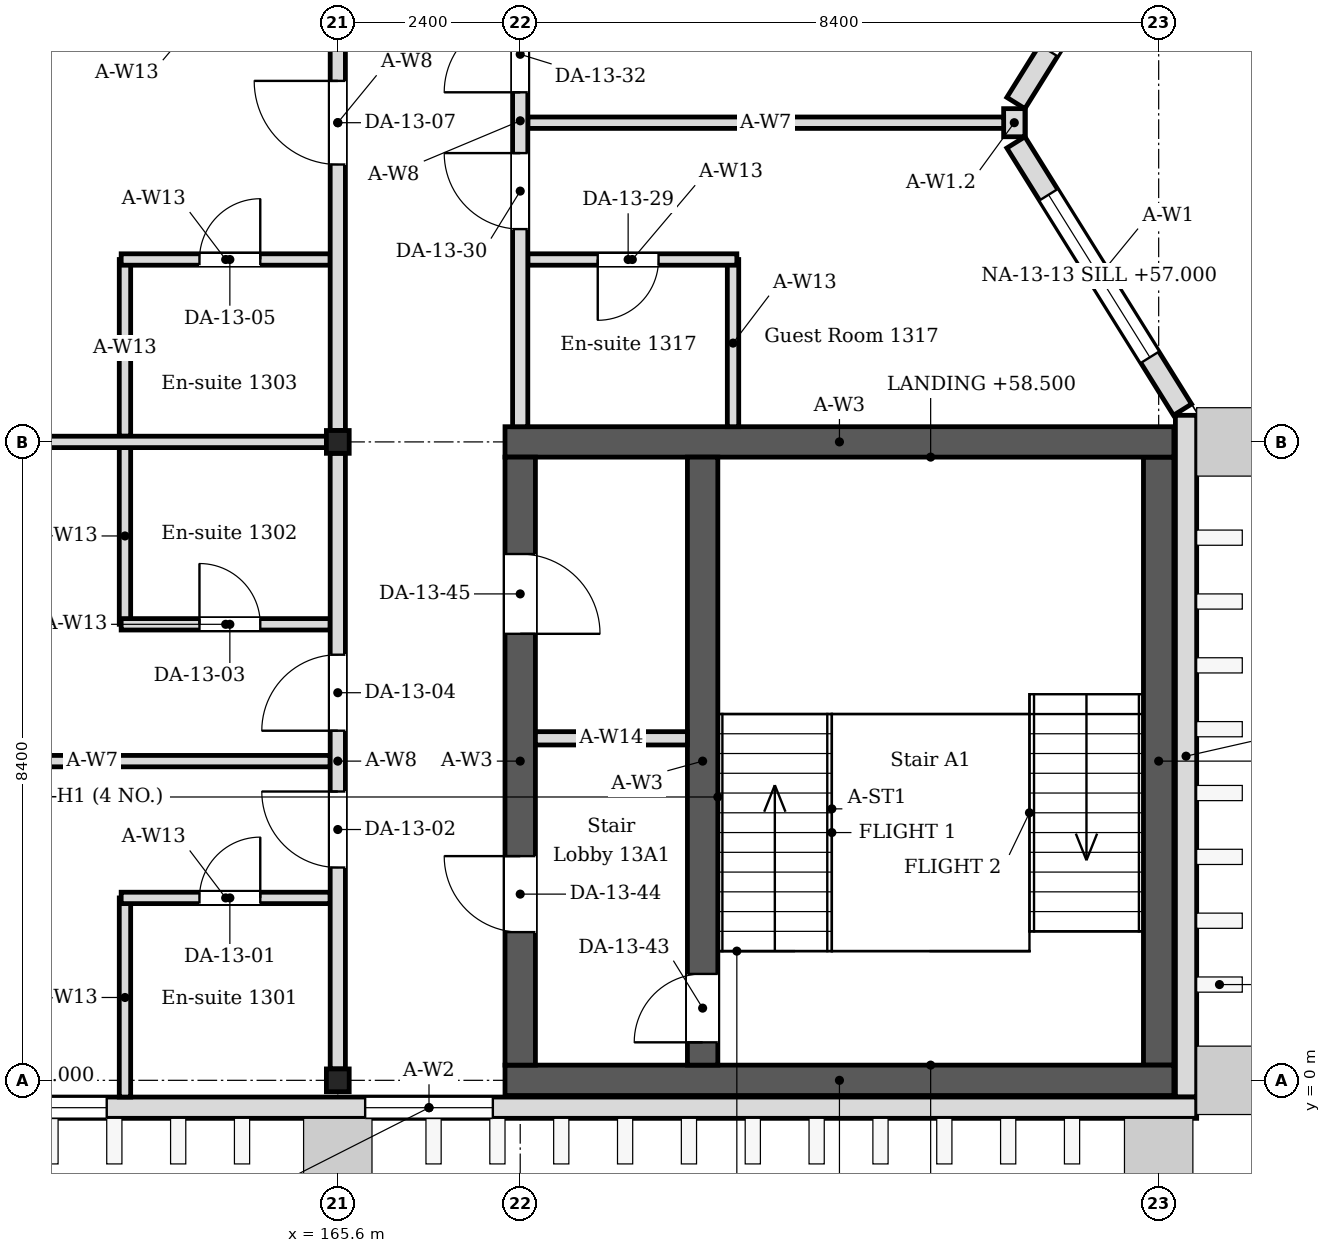
"""IFC4 building model, lengths in metres.
Left out: names, types, materials, properties, quantities, classifications, styles, units other than length and angle.
Written with IfcOpenShell. Run it as: python <this file> out.ifc"""

import sys

from ifc_helpers import new_model, si_unit, direction, frame, frame_2d, origin, origin_2d, place, context, subcontext, project, spatial, rectangle, i_section, extrude, element, fill, save


model = new_model("IFC4")
c1 = context("Model", 3, precision=1e-05, world=origin(), true_north=direction((0.0, 1.0)))
c2 = subcontext(c1, "Body", "Model", "MODEL_VIEW")
j1 = project(units=[si_unit("LENGTHUNIT", "METRE"), si_unit("PLANEANGLEUNIT", "RADIAN")], contexts=[c1])
p1 = place(None, origin())
s1 = spatial("IfcSite", under=j1, at=p1, CompositionType="ELEMENT")
p2 = place(p1, origin())
s2 = spatial("IfcBuilding", under=s1, at=p2, CompositionType="ELEMENT")
p3 = place(p2, frame((0.0, 0.0, 56.4)))
s3 = spatial("IfcBuildingStorey", under=s2, at=p3, CompositionType="ELEMENT", Elevation=56.4)
for number, where, z_axis, x_axis in (
    (1, (165.6, 0.0, 0.0), (0.0, 0.0, 1.0), (1.0, 0.0, 0.0)),
    (2, (165.6, 8.4, 0.0), (0.0, 0.0, 1.0), (1.0, 0.0, 0.0)),
):
    element("IfcColumn", number, at=place(p3, frame(where, z_axis=z_axis, x_axis=x_axis)), inside=s3, PredefinedType="COLUMN", context=c2, shape_type="SweptSolid", body=[
        extrude(i_section(OverallWidth=0.3, OverallDepth=0.3, WebThickness=0.01, FlangeThickness=0.015, FilletRadius=0.013, at=origin_2d()), origin(), (0.0, 0.0, 1.0), 4.2),
    ])
for number, where, z_axis, x_axis in (
    (3, (167.8, 0.0, 0.0), (0.0, 0.0, 1.0), (1.0, 0.0, 0.0)),
    (4, (167.8, 8.4, 0.0), (0.0, 0.0, 1.0), (1.0, 0.0, 0.0)),
):
    element("IfcWall", number, at=place(p3, frame(where, z_axis=z_axis, x_axis=x_axis)), inside=s3, PredefinedType="SOLIDWALL", context=c2, shape_type="SweptSolid", body=[
        extrude(rectangle(XDim=8.8, YDim=0.4, at=frame_2d((4.4, 0.0))), origin(), (0.0, 0.0, 1.0), 4.05),
    ])
p4 = place(p3, frame((168.0, 0.2, 0.0), z_axis=(0.0, 0.0, 1.0), x_axis=(0.0, 1.0, 0.0)))
e5 = element("IfcWall", 5, at=p4, inside=s3, PredefinedType="SOLIDWALL", context=c2, shape_type="SweptSolid", body=[
    extrude(rectangle(XDim=8.0, YDim=0.4, at=frame_2d((4.0, 0.0))), origin(), (0.0, 0.0, 1.0), 4.05),
])
p5 = place(p4, frame((1.75, 0.0, 0.0)))
e6 = element("IfcOpeningElement", 6, at=p5, cuts=e5, PredefinedType="OPENING", context=c2, shape_type="SweptSolid", body=[
    extrude(rectangle(XDim=1.0, YDim=2.1, at=frame_2d((0.5, 1.05))), frame((0.0, 0.21, 0.0), z_axis=(0.0, -1.0, 0.0), x_axis=(1.0, 0.0, 0.0)), (0.0, 0.0, 1.0), 0.42),
])
p6 = place(p4, frame((5.675, 0.0, 0.0)))
e7 = element("IfcOpeningElement", 7, at=p6, cuts=e5, PredefinedType="OPENING", context=c2, shape_type="SweptSolid", body=[
    extrude(rectangle(XDim=1.05, YDim=2.1, at=frame_2d((0.525, 1.05))), frame((0.0, 0.21, 0.0), z_axis=(0.0, -1.0, 0.0), x_axis=(1.0, 0.0, 0.0)), (0.0, 0.0, 1.0), 0.42),
])
p7 = place(p3, frame((176.4, 0.2, 0.0), z_axis=(0.0, 0.0, 1.0), x_axis=(0.0, 1.0, 0.0)))
e8 = element("IfcWall", 8, at=p7, inside=s3, PredefinedType="SOLIDWALL", context=c2, shape_type="SweptSolid", body=[
    extrude(rectangle(XDim=8.0, YDim=0.4, at=frame_2d((4.0, 0.0))), origin(), (0.0, 0.0, 1.0), 4.05),
])
p8 = place(p3, frame((176.76, -0.22, 0.0), z_axis=(0.0, 0.0, 1.0), x_axis=(0.0, 1.0, 0.0)))
e9 = element("IfcWall", 9, at=p8, inside=s3, PredefinedType="SOLIDWALL", context=c2, shape_type="SweptSolid", body=[
    extrude(rectangle(XDim=8.97, YDim=0.28, at=frame_2d((4.485, 0.0))), origin(), (0.0, 0.0, 1.0), 4.05),
])
p9 = place(p3, frame((176.714, 8.824, 0.0), z_axis=(0.0, 0.0, 1.0), x_axis=(-0.529018946142, 0.848610013271, 0.0)))
e10 = element("IfcWall", 10, at=p9, inside=s3, PredefinedType="SOLIDWALL", context=c2, shape_type="SweptSolid", body=[
    extrude(rectangle(XDim=4.144, YDim=0.28, at=frame_2d((2.072, 0.0))), origin(), (0.0, 0.0, 1.0), 4.05),
])
p10 = place(p9, frame((0.812, 0.0, 0.6)))
e11 = element("IfcOpeningElement", 11, at=p10, cuts=e10, PredefinedType="OPENING", context=c2, shape_type="SweptSolid", body=[
    extrude(rectangle(XDim=2.52, YDim=2.4, at=frame_2d((1.26, 1.2))), frame((0.0, 0.15, 0.0), z_axis=(0.0, -1.0, 0.0), x_axis=(1.0, 0.0, 0.0)), (0.0, 0.0, 1.0), 0.3),
])
p11 = place(p3, frame((174.521, 12.859, 0.0), z_axis=(0.0, 0.0, 1.0), x_axis=(0.528992500338, 0.848626498871, 0.0)))
e12 = element("IfcWall", 12, at=p11, inside=s3, PredefinedType="SOLIDWALL", context=c2, shape_type="SweptSolid", body=[
    extrude(rectangle(XDim=4.145, YDim=0.28, at=frame_2d((2.072, 0.0))), origin(), (0.0, 0.0, 1.0), 4.05),
])
p12 = place(p11, frame((0.812, 0.0, 0.6)))
e13 = element("IfcOpeningElement", 13, at=p12, cuts=e12, PredefinedType="OPENING", context=c2, shape_type="SweptSolid", body=[
    extrude(rectangle(XDim=2.52, YDim=2.4, at=frame_2d((1.26, 1.2))), frame((0.0, 0.15, 0.0), z_axis=(0.0, -1.0, 0.0), x_axis=(1.0, 0.0, 0.0)), (0.0, 0.0, 1.0), 0.3),
])
p13 = place(p3, frame((174.5, 12.415, 0.0), z_axis=(0.0, 0.0, 1.0), x_axis=(0.0, 1.0, 0.0)))
e14 = element("IfcWall", 14, at=p13, inside=s3, PredefinedType="SOLIDWALL", context=c2, shape_type="SweptSolid", body=[
    extrude(rectangle(XDim=0.37, YDim=0.28, at=frame_2d((0.185, 0.0))), origin(), (0.0, 0.0, 1.0), 3.604),
])
p14 = place(p3, frame((156.7, -0.36, 0.0), z_axis=(0.0, 0.0, 1.0), x_axis=(1.0, 0.0, 0.0)))
e15 = element("IfcWall", 15, at=p14, inside=s3, PredefinedType="SOLIDWALL", context=c2, shape_type="SweptSolid", body=[
    extrude(rectangle(XDim=20.2, YDim=0.28, at=frame_2d((10.1, 0.0))), origin(), (0.0, 0.0, 1.0), 4.05),
])
p15 = place(p14, frame((9.26, 0.0, 0.6)))
e16 = element("IfcOpeningElement", 16, at=p15, cuts=e15, PredefinedType="OPENING", context=c2, shape_type="SweptSolid", body=[
    extrude(rectangle(XDim=1.68, YDim=2.4, at=frame_2d((0.84, 1.2))), frame((0.0, 0.15, 0.0), z_axis=(0.0, -1.0, 0.0), x_axis=(1.0, 0.0, 0.0)), (0.0, 0.0, 1.0), 0.3),
])
p16 = place(p14, frame((3.34, 0.0, 0.6)))
e17 = element("IfcOpeningElement", 17, at=p16, cuts=e15, PredefinedType="OPENING", context=c2, shape_type="SweptSolid", body=[
    extrude(rectangle(XDim=2.52, YDim=2.4, at=frame_2d((1.26, 1.2))), frame((0.0, 0.15, 0.0), z_axis=(0.0, -1.0, 0.0), x_axis=(1.0, 0.0, 0.0)), (0.0, 0.0, 1.0), 0.3),
])
p17 = place(p3, frame((162.8, -0.22, 0.0), z_axis=(0.0, 0.0, 1.0), x_axis=(0.0, 1.0, 0.0)))
e18 = element("IfcWall", 18, at=p17, inside=s3, PredefinedType="PARTITIONING", context=c2, shape_type="SweptSolid", body=[
    extrude(rectangle(XDim=2.62, YDim=0.15, at=frame_2d((1.31, 0.0))), origin(), (0.0, 0.0, 1.0), 4.05),
])
p18 = place(p3, frame((162.75, 2.4, 0.0), z_axis=(0.0, 0.0, 1.0), x_axis=(1.0, 0.0, 0.0)))
e19 = element("IfcWall", 19, at=p18, inside=s3, PredefinedType="PARTITIONING", context=c2, shape_type="SweptSolid", body=[
    extrude(rectangle(XDim=2.75, YDim=0.15, at=frame_2d((1.375, 0.0))), origin(), (0.0, 0.0, 1.0), 4.05),
])
p19 = place(p18, frame((1.03, 0.0, 0.0)))
e20 = element("IfcOpeningElement", 20, at=p19, cuts=e19, PredefinedType="OPENING", context=c2, shape_type="SweptSolid", body=[
    extrude(rectangle(XDim=0.8, YDim=2.1, at=frame_2d((0.4, 1.05))), frame((0.0, 0.085, 0.0), z_axis=(0.0, -1.0, 0.0), x_axis=(1.0, 0.0, 0.0)), (0.0, 0.0, 1.0), 0.17),
])
p20 = place(p3, frame((162.8, 6.0, 0.0), z_axis=(0.0, 0.0, 1.0), x_axis=(0.0, 1.0, 0.0)))
e21 = element("IfcWall", 21, at=p20, inside=s3, PredefinedType="PARTITIONING", context=c2, shape_type="SweptSolid", body=[
    extrude(rectangle(XDim=2.325, YDim=0.15, at=frame_2d((1.163, 0.0))), origin(), (0.0, 0.0, 1.0), 4.05),
])
p21 = place(p3, frame((162.75, 6.0, 0.0), z_axis=(0.0, 0.0, 1.0), x_axis=(1.0, 0.0, 0.0)))
e22 = element("IfcWall", 22, at=p21, inside=s3, PredefinedType="PARTITIONING", context=c2, shape_type="SweptSolid", body=[
    extrude(rectangle(XDim=2.75, YDim=0.15, at=frame_2d((1.375, 0.0))), origin(), (0.0, 0.0, 1.0), 4.05),
])
p22 = place(p21, frame((1.03, 0.0, 0.0)))
e23 = element("IfcOpeningElement", 23, at=p22, cuts=e22, PredefinedType="OPENING", context=c2, shape_type="SweptSolid", body=[
    extrude(rectangle(XDim=0.8, YDim=2.1, at=frame_2d((0.4, 1.05))), frame((0.0, 0.085, 0.0), z_axis=(0.0, -1.0, 0.0), x_axis=(1.0, 0.0, 0.0)), (0.0, 0.0, 1.0), 0.17),
])
p23 = place(p3, frame((162.8, 8.475, 0.0), z_axis=(0.0, 0.0, 1.0), x_axis=(0.0, 1.0, 0.0)))
e24 = element("IfcWall", 24, at=p23, inside=s3, PredefinedType="PARTITIONING", context=c2, shape_type="SweptSolid", body=[
    extrude(rectangle(XDim=2.325, YDim=0.15, at=frame_2d((1.163, 0.0))), origin(), (0.0, 0.0, 1.0), 4.05),
])
p24 = place(p3, frame((162.75, 10.8, 0.0), z_axis=(0.0, 0.0, 1.0), x_axis=(1.0, 0.0, 0.0)))
e25 = element("IfcWall", 25, at=p24, inside=s3, PredefinedType="PARTITIONING", context=c2, shape_type="SweptSolid", body=[
    extrude(rectangle(XDim=2.75, YDim=0.15, at=frame_2d((1.375, 0.0))), origin(), (0.0, 0.0, 1.0), 4.05),
])
p25 = place(p24, frame((1.03, 0.0, 0.0)))
e26 = element("IfcOpeningElement", 26, at=p25, cuts=e25, PredefinedType="OPENING", context=c2, shape_type="SweptSolid", body=[
    extrude(rectangle(XDim=0.8, YDim=2.1, at=frame_2d((0.4, 1.05))), frame((0.0, 0.085, 0.0), z_axis=(0.0, -1.0, 0.0), x_axis=(1.0, 0.0, 0.0)), (0.0, 0.0, 1.0), 0.17),
])
p26 = place(p3, frame((170.8, 8.6, 0.0), z_axis=(0.0, 0.0, 1.0), x_axis=(0.0, 1.0, 0.0)))
e27 = element("IfcWall", 27, at=p26, inside=s3, PredefinedType="PARTITIONING", context=c2, shape_type="SweptSolid", body=[
    extrude(rectangle(XDim=2.2, YDim=0.15, at=frame_2d((1.1, 0.0))), origin(), (0.0, 0.0, 1.0), 4.05),
])
p27 = place(p3, frame((170.85, 10.8, 0.0), z_axis=(0.0, 0.0, 1.0), x_axis=(-1.0, 0.0, 0.0)))
e28 = element("IfcWall", 28, at=p27, inside=s3, PredefinedType="PARTITIONING", context=c2, shape_type="SweptSolid", body=[
    extrude(rectangle(XDim=2.75, YDim=0.15, at=frame_2d((1.375, 0.0))), origin(), (0.0, 0.0, 1.0), 4.05),
])
p28 = place(p27, frame((1.03, 0.0, 0.0)))
e29 = element("IfcOpeningElement", 29, at=p28, cuts=e28, PredefinedType="OPENING", context=c2, shape_type="SweptSolid", body=[
    extrude(rectangle(XDim=0.8, YDim=2.1, at=frame_2d((0.4, 1.05))), frame((0.0, 0.085, 0.0), z_axis=(0.0, -1.0, 0.0), x_axis=(1.0, 0.0, 0.0)), (0.0, 0.0, 1.0), 0.17),
])
p29 = place(p3, frame((157.35, 8.4, 0.0), z_axis=(0.0, 0.0, 1.0), x_axis=(1.0, 0.0, 0.0)))
e30 = element("IfcWall", 30, at=p29, inside=s3, PredefinedType="PARTITIONING", context=c2, shape_type="SweptSolid", body=[
    extrude(rectangle(XDim=8.1, YDim=0.15, at=frame_2d((4.05, 0.0))), origin(), (0.0, 0.0, 1.0), 3.604),
])
for number, where, z_axis, x_axis in (
    (31, (159.24, 4.2, 0.0), (0.0, 0.0, 1.0), (1.0, 0.0, 0.0)),
    (32, (168.1, 12.6, 0.0), (0.0, 0.0, 1.0), (1.0, 0.0, 0.0)),
):
    element("IfcWall", number, at=place(p3, frame(where, z_axis=z_axis, x_axis=x_axis)), inside=s3, PredefinedType="PARTITIONING", context=c2, shape_type="SweptSolid", body=[
        extrude(rectangle(XDim=6.26, YDim=0.15, at=frame_2d((3.13, 0.0))), origin(), (0.0, 0.0, 1.0), 3.604),
    ])
p30 = place(p3, frame((165.6, 0.15, 0.0), z_axis=(0.0, 0.0, 1.0), x_axis=(0.0, 1.0, 0.0)))
e33 = element("IfcWall", 33, at=p30, inside=s3, PredefinedType="PARTITIONING", context=c2, shape_type="SweptSolid", body=[
    extrude(rectangle(XDim=8.1, YDim=0.2, at=frame_2d((4.05, 0.0))), origin(), (0.0, 0.0, 1.0), 3.45),
])
p31 = place(p30, frame((2.65, 0.0, 0.0)))
e34 = element("IfcOpeningElement", 34, at=p31, cuts=e33, PredefinedType="OPENING", context=c2, shape_type="SweptSolid", body=[
    extrude(rectangle(XDim=1.0, YDim=2.4, at=frame_2d((0.5, 1.2))), frame((0.0, 0.11, 0.0), z_axis=(0.0, -1.0, 0.0), x_axis=(1.0, 0.0, 0.0)), (0.0, 0.0, 1.0), 0.22),
])
p32 = place(p30, frame((4.45, 0.0, 0.0)))
e35 = element("IfcOpeningElement", 35, at=p32, cuts=e33, PredefinedType="OPENING", context=c2, shape_type="SweptSolid", body=[
    extrude(rectangle(XDim=1.0, YDim=2.4, at=frame_2d((0.5, 1.2))), frame((0.0, 0.11, 0.0), z_axis=(0.0, -1.0, 0.0), x_axis=(1.0, 0.0, 0.0)), (0.0, 0.0, 1.0), 0.22),
])
p33 = place(p3, frame((165.6, 8.55, 0.0), z_axis=(0.0, 0.0, 1.0), x_axis=(0.0, 1.0, 0.0)))
e36 = element("IfcWall", 36, at=p33, inside=s3, PredefinedType="PARTITIONING", context=c2, shape_type="SweptSolid", body=[
    extrude(rectangle(XDim=8.1, YDim=0.2, at=frame_2d((4.05, 0.0))), origin(), (0.0, 0.0, 1.0), 3.45),
])
p34 = place(p33, frame((3.5, 0.0, 0.0)))
e37 = element("IfcOpeningElement", 37, at=p34, cuts=e36, PredefinedType="OPENING", context=c2, shape_type="SweptSolid", body=[
    extrude(rectangle(XDim=1.1, YDim=2.4, at=frame_2d((0.55, 1.2))), frame((0.0, 0.11, 0.0), z_axis=(0.0, -1.0, 0.0), x_axis=(1.0, 0.0, 0.0)), (0.0, 0.0, 1.0), 0.22),
])
p35 = place(p3, frame((168.0, 8.6, 0.0), z_axis=(0.0, 0.0, 1.0), x_axis=(0.0, 1.0, 0.0)))
e38 = element("IfcWall", 38, at=p35, inside=s3, PredefinedType="PARTITIONING", context=c2, shape_type="SweptSolid", body=[
    extrude(rectangle(XDim=8.05, YDim=0.2, at=frame_2d((4.025, 0.0))), origin(), (0.0, 0.0, 1.0), 3.45),
])
p36 = place(p35, frame((2.6, 0.0, 0.0)))
e39 = element("IfcOpeningElement", 39, at=p36, cuts=e38, PredefinedType="OPENING", context=c2, shape_type="SweptSolid", body=[
    extrude(rectangle(XDim=1.0, YDim=2.4, at=frame_2d((0.5, 1.2))), frame((0.0, 0.11, 0.0), z_axis=(0.0, -1.0, 0.0), x_axis=(1.0, 0.0, 0.0)), (0.0, 0.0, 1.0), 0.22),
])
p37 = place(p35, frame((4.4, 0.0, 0.0)))
e40 = element("IfcOpeningElement", 40, at=p37, cuts=e38, PredefinedType="OPENING", context=c2, shape_type="SweptSolid", body=[
    extrude(rectangle(XDim=1.0, YDim=2.4, at=frame_2d((0.5, 1.2))), frame((0.0, 0.11, 0.0), z_axis=(0.0, -1.0, 0.0), x_axis=(1.0, 0.0, 0.0)), (0.0, 0.0, 1.0), 0.22),
])
p38 = place(p3, frame((170.4, 0.2, 0.0), z_axis=(0.0, 0.0, 1.0), x_axis=(0.0, 1.0, 0.0)))
e41 = element("IfcWall", 41, at=p38, inside=s3, PredefinedType="SOLIDWALL", context=c2, shape_type="SweptSolid", body=[
    extrude(rectangle(XDim=8.0, YDim=0.4, at=frame_2d((4.0, 0.0))), origin(), (0.0, 0.0, 1.0), 4.05),
])
p39 = place(p38, frame((0.3, 0.0, 0.0)))
e42 = element("IfcOpeningElement", 42, at=p39, cuts=e41, PredefinedType="OPENING", context=c2, shape_type="SweptSolid", body=[
    extrude(rectangle(XDim=0.9, YDim=2.1, at=frame_2d((0.45, 1.05))), frame((0.0, 0.21, 0.0), z_axis=(0.0, -1.0, 0.0), x_axis=(1.0, 0.0, 0.0)), (0.0, 0.0, 1.0), 0.42),
])
p40 = place(p3, frame((168.2, 4.5, 0.0), z_axis=(0.0, 0.0, 1.0), x_axis=(1.0, 0.0, 0.0)))
e43 = element("IfcWall", 43, at=p40, inside=s3, PredefinedType="PARTITIONING", context=c2, shape_type="SweptSolid", body=[
    extrude(rectangle(XDim=2.0, YDim=0.175, at=frame_2d((1.0, 0.0))), origin(), (0.0, 0.0, 1.0), 4.05),
])
p41 = place(p10, origin())
e44 = element("IfcWindow", 44, at=p41, inside=s3, PartitioningType="SINGLE_PANEL", PredefinedType="WINDOW", context=c2, shape_type="SweptSolid", body=[
    extrude(rectangle(XDim=2.52, YDim=2.4, at=frame_2d((1.26, 1.2))), frame((0.0, 0.03, 0.0), z_axis=(0.0, -1.0, 0.0), x_axis=(1.0, 0.0, 0.0)), (0.0, 0.0, 1.0), 0.06),
])
fill(e11, e44)
p42 = place(p15, origin())
e45 = element("IfcWindow", 45, at=p42, inside=s3, PartitioningType="SINGLE_PANEL", PredefinedType="WINDOW", context=c2, shape_type="SweptSolid", body=[
    extrude(rectangle(XDim=1.68, YDim=2.4, at=frame_2d((0.84, 1.2))), frame((0.0, 0.03, 0.0), z_axis=(0.0, -1.0, 0.0), x_axis=(1.0, 0.0, 0.0)), (0.0, 0.0, 1.0), 0.06),
])
fill(e16, e45)
p43 = place(p16, origin())
e46 = element("IfcWindow", 46, at=p43, inside=s3, PartitioningType="SINGLE_PANEL", PredefinedType="WINDOW", context=c2, shape_type="SweptSolid", body=[
    extrude(rectangle(XDim=2.52, YDim=2.4, at=frame_2d((1.26, 1.2))), frame((0.0, 0.03, 0.0), z_axis=(0.0, -1.0, 0.0), x_axis=(1.0, 0.0, 0.0)), (0.0, 0.0, 1.0), 0.06),
])
fill(e17, e46)
p44 = place(p19, origin())
e47 = element("IfcDoor", 47, at=p44, inside=s3, OperationType="SINGLE_SWING_RIGHT", PredefinedType="DOOR", context=c2, shape_type="SweptSolid", body=[
    extrude(rectangle(XDim=0.8, YDim=2.1, at=frame_2d((0.4, 1.05))), frame((0.0, 0.025, 0.0), z_axis=(0.0, -1.0, 0.0), x_axis=(1.0, 0.0, 0.0)), (0.0, 0.0, 1.0), 0.05),
])
fill(e20, e47)
p45 = place(p31, origin())
e48 = element("IfcDoor", 48, at=p45, inside=s3, OperationType="SINGLE_SWING_RIGHT", PredefinedType="DOOR", context=c2, shape_type="SweptSolid", body=[
    extrude(rectangle(XDim=1.0, YDim=2.4, at=frame_2d((0.5, 1.2))), frame((0.0, 0.025, 0.0), z_axis=(0.0, -1.0, 0.0), x_axis=(1.0, 0.0, 0.0)), (0.0, 0.0, 1.0), 0.05),
])
fill(e34, e48)
p46 = place(p22, origin())
e49 = element("IfcDoor", 49, at=p46, inside=s3, OperationType="SINGLE_SWING_LEFT", PredefinedType="DOOR", context=c2, shape_type="SweptSolid", body=[
    extrude(rectangle(XDim=0.8, YDim=2.1, at=frame_2d((0.4, 1.05))), frame((0.0, 0.025, 0.0), z_axis=(0.0, -1.0, 0.0), x_axis=(1.0, 0.0, 0.0)), (0.0, 0.0, 1.0), 0.05),
])
fill(e23, e49)
p47 = place(p32, origin())
e50 = element("IfcDoor", 50, at=p47, inside=s3, OperationType="SINGLE_SWING_LEFT", PredefinedType="DOOR", context=c2, shape_type="SweptSolid", body=[
    extrude(rectangle(XDim=1.0, YDim=2.4, at=frame_2d((0.5, 1.2))), frame((0.0, 0.025, 0.0), z_axis=(0.0, -1.0, 0.0), x_axis=(1.0, 0.0, 0.0)), (0.0, 0.0, 1.0), 0.05),
])
fill(e35, e50)
p48 = place(p25, origin())
e51 = element("IfcDoor", 51, at=p48, inside=s3, OperationType="SINGLE_SWING_RIGHT", PredefinedType="DOOR", context=c2, shape_type="SweptSolid", body=[
    extrude(rectangle(XDim=0.8, YDim=2.1, at=frame_2d((0.4, 1.05))), frame((0.0, 0.025, 0.0), z_axis=(0.0, -1.0, 0.0), x_axis=(1.0, 0.0, 0.0)), (0.0, 0.0, 1.0), 0.05),
])
fill(e26, e51)
p49 = place(p34, origin())
e52 = element("IfcDoor", 52, at=p49, inside=s3, OperationType="SINGLE_SWING_RIGHT", PredefinedType="DOOR", context=c2, shape_type="SweptSolid", body=[
    extrude(rectangle(XDim=1.1, YDim=2.4, at=frame_2d((0.55, 1.2))), frame((0.0, 0.025, 0.0), z_axis=(0.0, -1.0, 0.0), x_axis=(1.0, 0.0, 0.0)), (0.0, 0.0, 1.0), 0.05),
])
fill(e37, e52)
p50 = place(p28, origin())
e53 = element("IfcDoor", 53, at=p50, inside=s3, OperationType="SINGLE_SWING_RIGHT", PredefinedType="DOOR", context=c2, shape_type="SweptSolid", body=[
    extrude(rectangle(XDim=0.8, YDim=2.1, at=frame_2d((0.4, 1.05))), frame((0.0, 0.025, 0.0), z_axis=(0.0, -1.0, 0.0), x_axis=(1.0, 0.0, 0.0)), (0.0, 0.0, 1.0), 0.05),
])
fill(e29, e53)
p51 = place(p36, origin())
e54 = element("IfcDoor", 54, at=p51, inside=s3, OperationType="SINGLE_SWING_RIGHT", PredefinedType="DOOR", context=c2, shape_type="SweptSolid", body=[
    extrude(rectangle(XDim=1.0, YDim=2.4, at=frame_2d((0.5, 1.2))), frame((0.0, 0.025, 0.0), z_axis=(0.0, -1.0, 0.0), x_axis=(1.0, 0.0, 0.0)), (0.0, 0.0, 1.0), 0.05),
])
fill(e39, e54)
p52 = place(p37, origin())
e55 = element("IfcDoor", 55, at=p52, inside=s3, OperationType="SINGLE_SWING_LEFT", PredefinedType="DOOR", context=c2, shape_type="SweptSolid", body=[
    extrude(rectangle(XDim=1.0, YDim=2.4, at=frame_2d((0.5, 1.2))), frame((0.0, 0.025, 0.0), z_axis=(0.0, -1.0, 0.0), x_axis=(1.0, 0.0, 0.0)), (0.0, 0.0, 1.0), 0.05),
])
fill(e40, e55)
p53 = place(p39, origin())
e56 = element("IfcDoor", 56, at=p53, inside=s3, OperationType="SINGLE_SWING_LEFT", PredefinedType="DOOR", context=c2, shape_type="SweptSolid", body=[
    extrude(rectangle(XDim=0.9, YDim=2.1, at=frame_2d((0.45, 1.05))), frame((0.0, 0.025, 0.0), z_axis=(0.0, -1.0, 0.0), x_axis=(1.0, 0.0, 0.0)), (0.0, 0.0, 1.0), 0.05),
])
fill(e42, e56)
p54 = place(p5, origin())
e57 = element("IfcDoor", 57, at=p54, inside=s3, OperationType="SINGLE_SWING_RIGHT", PredefinedType="DOOR", context=c2, shape_type="SweptSolid", body=[
    extrude(rectangle(XDim=1.0, YDim=2.1, at=frame_2d((0.5, 1.05))), frame((0.0, 0.025, 0.0), z_axis=(0.0, -1.0, 0.0), x_axis=(1.0, 0.0, 0.0)), (0.0, 0.0, 1.0), 0.05),
])
fill(e6, e57)
p55 = place(p6, origin())
e58 = element("IfcDoor", 58, at=p55, inside=s3, OperationType="SINGLE_SWING_LEFT", PredefinedType="DOOR", context=c2, shape_type="SweptSolid", body=[
    extrude(rectangle(XDim=1.05, YDim=2.1, at=frame_2d((0.525, 1.05))), frame((0.0, 0.025, 0.0), z_axis=(0.0, -1.0, 0.0), x_axis=(1.0, 0.0, 0.0)), (0.0, 0.0, 1.0), 0.05),
])
fill(e7, e58)
save(model, sys.argv[1])
